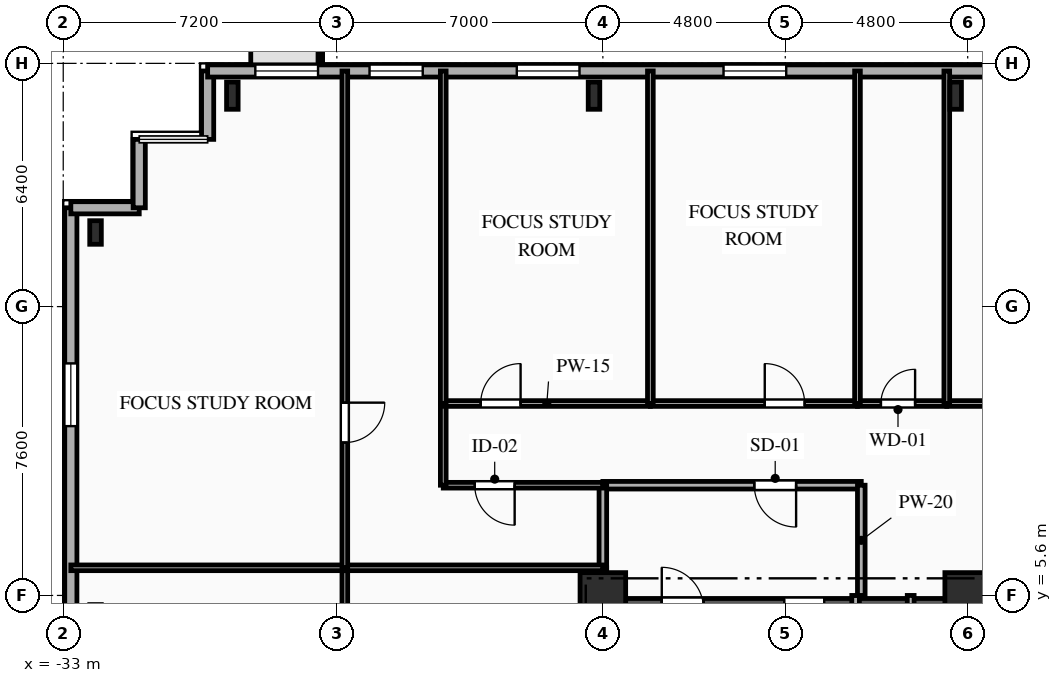
"""IFC4 building model, lengths in metres.
Left out: names, types, materials, properties, quantities, classifications, styles, units other than length and angle.
Written with IfcOpenShell. Run it as: python <this file> out.ifc"""

import sys

from ifc_helpers import new_model, si_unit, direction, frame, frame_2d, origin, origin_2d, place, context, subcontext, project, spatial, rectangle, i_section, extrude, element, fill, save


model = new_model("IFC4")
c1 = context("Model", 3, precision=1e-05, world=origin(), true_north=direction((0.0, 1.0)))
c2 = subcontext(c1, "Body", "Model", "MODEL_VIEW")
j1 = project(units=[si_unit("LENGTHUNIT", "METRE"), si_unit("PLANEANGLEUNIT", "RADIAN")], contexts=[c1])
p1 = place(None, origin())
s1 = spatial("IfcSite", under=j1, at=p1, CompositionType="ELEMENT")
p2 = place(p1, origin())
s2 = spatial("IfcBuilding", under=s1, at=p2, CompositionType="ELEMENT")
p3 = place(p2, frame((0.0, 0.0, 67.2)))
s3 = spatial("IfcBuildingStorey", under=s2, at=p3, CompositionType="ELEMENT", Elevation=67.2)
for number, where, z_axis, x_axis in (
    (1, (-18.8, 5.6, 0.0), (0.0, 0.0, 1.0), (1.0, 0.0, 0.0)),
    (2, (-9.2, 5.6, 0.0), (0.0, 0.0, 1.0), (1.0, 0.0, 0.0)),
):
    element("IfcColumn", number, at=place(p3, frame(where, z_axis=z_axis, x_axis=x_axis)), inside=s3, PredefinedType="COLUMN", context=c2, shape_type="SweptSolid", body=[
        extrude(rectangle(XDim=1.2, YDim=1.2, at=origin_2d()), origin(), (0.0, 0.0, 1.0), 3.35),
    ])
for number, where, z_axis, x_axis in (
    (3, (-9.517, 18.75, 0.0), (0.0, 0.0, 1.0), (1.0, 0.0, 0.0)),
    (4, (-19.033, 18.75, 0.0), (0.0, 0.0, 1.0), (1.0, 0.0, 0.0)),
    (5, (-28.55, 18.75, 0.0), (0.0, 0.0, 1.0), (1.0, 0.0, 0.0)),
):
    element("IfcColumn", number, at=place(p3, frame(where, z_axis=z_axis, x_axis=x_axis)), inside=s3, PredefinedType="COLUMN", context=c2, shape_type="SweptSolid", body=[
        extrude(i_section(OverallWidth=0.304, OverallDepth=0.716, WebThickness=0.021, FlangeThickness=0.04, FilletRadius=0.027, at=origin_2d()), origin(), (0.0, 0.0, 1.0), 3.35),
    ])
p4 = place(p3, frame((-32.15, 15.15, 0.0), z_axis=(0.0, 0.0, 1.0), x_axis=(1.0, 0.0, 0.0)))
e6 = element("IfcColumn", 6, at=p4, inside=s3, PredefinedType="COLUMN", context=c2, shape_type="SweptSolid", body=[
    extrude(i_section(OverallWidth=0.305, OverallDepth=0.62, WebThickness=0.021, FlangeThickness=0.04, FilletRadius=0.027, at=origin_2d()), origin(), (0.0, 0.0, 1.0), 3.35),
])
p5 = place(p3, frame((-32.8, -15.8, 0.0), z_axis=(0.0, 0.0, 1.0), x_axis=(0.0, 1.0, 0.0)))
e7 = element("IfcWall", 7, at=p5, inside=s3, PredefinedType="SOLIDWALL", context=c2, shape_type="SweptSolid", body=[
    extrude(rectangle(XDim=31.6, YDim=0.32, at=frame_2d((15.8, 0.0))), origin(), (0.0, 0.0, 1.0), 3.035),
])
p6 = place(p5, frame((4.175, 0.0, 0.85)))
e8 = element("IfcOpeningElement", 8, at=p6, cuts=e7, PredefinedType="OPENING", context=c2, shape_type="SweptSolid", body=[
    extrude(rectangle(XDim=1.65, YDim=1.85, at=frame_2d((0.825, 0.925))), frame((0.0, 0.17, 0.0), z_axis=(0.0, -1.0, 0.0), x_axis=(1.0, 0.0, 0.0)), (0.0, 0.0, 1.0), 0.34),
])
p7 = place(p5, frame((15.015, 0.0, 0.85)))
e9 = element("IfcOpeningElement", 9, at=p7, cuts=e7, PredefinedType="OPENING", context=c2, shape_type="SweptSolid", body=[
    extrude(rectangle(XDim=1.65, YDim=1.85, at=frame_2d((0.825, 0.925))), frame((0.0, 0.17, 0.0), z_axis=(0.0, -1.0, 0.0), x_axis=(1.0, 0.0, 0.0)), (0.0, 0.0, 1.0), 0.34),
])
p8 = place(p5, frame((25.855, 0.0, 0.85)))
e10 = element("IfcOpeningElement", 10, at=p8, cuts=e7, PredefinedType="OPENING", context=c2, shape_type="SweptSolid", body=[
    extrude(rectangle(XDim=1.65, YDim=1.85, at=frame_2d((0.825, 0.925))), frame((0.0, 0.17, 0.0), z_axis=(0.0, -1.0, 0.0), x_axis=(1.0, 0.0, 0.0)), (0.0, 0.0, 1.0), 0.34),
])
for number, where, z_axis, x_axis in (
    (11, (-32.8, 15.8, 0.0), (0.0, 0.0, 1.0), (1.0, 0.0, 0.0)),
    (12, (-31.0, 15.8, 0.0), (0.0, 0.0, 1.0), (0.0, 1.0, 0.0)),
):
    element("IfcWall", number, at=place(p3, frame(where, z_axis=z_axis, x_axis=x_axis)), inside=s3, PredefinedType="SOLIDWALL", context=c2, shape_type="SweptSolid", body=[
        extrude(rectangle(XDim=1.8, YDim=0.32, at=frame_2d((0.9, 0.0))), origin(), (0.0, 0.0, 1.0), 3.035),
    ])
p9 = place(p3, frame((-29.2, 17.6, 0.0), z_axis=(0.0, 0.0, 1.0), x_axis=(0.0, 1.0, 0.0)))
e13 = element("IfcWall", 13, at=p9, inside=s3, PredefinedType="SOLIDWALL", context=c2, shape_type="SweptSolid", body=[
    extrude(rectangle(XDim=1.8, YDim=0.32, at=frame_2d((0.9, 0.0))), origin(), (0.0, 0.0, 1.0), 3.035),
])
p10 = place(p3, frame((-29.2, 19.4, 0.0), z_axis=(0.0, 0.0, 1.0), x_axis=(1.0, 0.0, 0.0)))
e14 = element("IfcWall", 14, at=p10, inside=s3, PredefinedType="SOLIDWALL", context=c2, shape_type="SweptSolid", body=[
    extrude(rectangle(XDim=58.4, YDim=0.32, at=frame_2d((29.2, 0.0))), origin(), (0.0, 0.0, 1.0), 3.035),
])
p11 = place(p10, frame((1.255, 0.0, 0.85)))
e15 = element("IfcOpeningElement", 15, at=p11, cuts=e14, PredefinedType="OPENING", context=c2, shape_type="SweptSolid", body=[
    extrude(rectangle(XDim=1.65, YDim=1.85, at=frame_2d((0.825, 0.925))), frame((0.0, 0.17, 0.0), z_axis=(0.0, -1.0, 0.0), x_axis=(1.0, 0.0, 0.0)), (0.0, 0.0, 1.0), 0.34),
])
p12 = place(p10, frame((4.26, 0.0, 0.85)))
e16 = element("IfcOpeningElement", 16, at=p12, cuts=e14, PredefinedType="OPENING", context=c2, shape_type="SweptSolid", body=[
    extrude(rectangle(XDim=1.4, YDim=1.85, at=frame_2d((0.7, 0.925))), frame((0.0, 0.17, 0.0), z_axis=(0.0, -1.0, 0.0), x_axis=(1.0, 0.0, 0.0)), (0.0, 0.0, 1.0), 0.34),
])
p13 = place(p10, frame((8.135, 0.0, 0.85)))
e17 = element("IfcOpeningElement", 17, at=p13, cuts=e14, PredefinedType="OPENING", context=c2, shape_type="SweptSolid", body=[
    extrude(rectangle(XDim=1.65, YDim=1.85, at=frame_2d((0.825, 0.925))), frame((0.0, 0.17, 0.0), z_axis=(0.0, -1.0, 0.0), x_axis=(1.0, 0.0, 0.0)), (0.0, 0.0, 1.0), 0.34),
])
p14 = place(p10, frame((13.575, 0.0, 0.85)))
e18 = element("IfcOpeningElement", 18, at=p14, cuts=e14, PredefinedType="OPENING", context=c2, shape_type="SweptSolid", body=[
    extrude(rectangle(XDim=1.65, YDim=1.85, at=frame_2d((0.825, 0.925))), frame((0.0, 0.17, 0.0), z_axis=(0.0, -1.0, 0.0), x_axis=(1.0, 0.0, 0.0)), (0.0, 0.0, 1.0), 0.34),
])
p15 = place(p10, frame((23.33, 0.0, 0.85)))
e19 = element("IfcOpeningElement", 19, at=p15, cuts=e14, PredefinedType="OPENING", context=c2, shape_type="SweptSolid", body=[
    extrude(rectangle(XDim=1.5, YDim=1.85, at=frame_2d((0.75, 0.925))), frame((0.0, 0.17, 0.0), z_axis=(0.0, -1.0, 0.0), x_axis=(1.0, 0.0, 0.0)), (0.0, 0.0, 1.0), 0.34),
])
p16 = place(p10, frame((33.3, 0.0, 0.85)))
e20 = element("IfcOpeningElement", 20, at=p16, cuts=e14, PredefinedType="OPENING", context=c2, shape_type="SweptSolid", body=[
    extrude(rectangle(XDim=2.2, YDim=1.85, at=frame_2d((1.1, 0.925))), frame((0.0, 0.17, 0.0), z_axis=(0.0, -1.0, 0.0), x_axis=(1.0, 0.0, 0.0)), (0.0, 0.0, 1.0), 0.34),
])
p17 = place(p10, frame((42.335, 0.0, 0.85)))
e21 = element("IfcOpeningElement", 21, at=p17, cuts=e14, PredefinedType="OPENING", context=c2, shape_type="SweptSolid", body=[
    extrude(rectangle(XDim=1.65, YDim=1.85, at=frame_2d((0.825, 0.925))), frame((0.0, 0.17, 0.0), z_axis=(0.0, -1.0, 0.0), x_axis=(1.0, 0.0, 0.0)), (0.0, 0.0, 1.0), 0.34),
])
p18 = place(p10, frame((48.905, 0.0, 0.85)))
e22 = element("IfcOpeningElement", 22, at=p18, cuts=e14, PredefinedType="OPENING", context=c2, shape_type="SweptSolid", body=[
    extrude(rectangle(XDim=1.65, YDim=1.85, at=frame_2d((0.825, 0.925))), frame((0.0, 0.17, 0.0), z_axis=(0.0, -1.0, 0.0), x_axis=(1.0, 0.0, 0.0)), (0.0, 0.0, 1.0), 0.34),
])
p19 = place(p10, frame((54.37, 0.0, 0.85)))
e23 = element("IfcOpeningElement", 23, at=p19, cuts=e14, PredefinedType="OPENING", context=c2, shape_type="SweptSolid", body=[
    extrude(rectangle(XDim=1.5, YDim=1.85, at=frame_2d((0.75, 0.925))), frame((0.0, 0.17, 0.0), z_axis=(0.0, -1.0, 0.0), x_axis=(1.0, 0.0, 0.0)), (0.0, 0.0, 1.0), 0.34),
])
p20 = place(p3, frame((-18.8, 5.24, 0.0), z_axis=(0.0, 0.0, 1.0), x_axis=(1.0, 0.0, 0.0)))
e24 = element("IfcWall", 24, at=p20, inside=s3, PredefinedType="SHEAR", context=c2, shape_type="SweptSolid", body=[
    extrude(rectangle(XDim=9.6, YDim=0.56, at=frame_2d((4.8, 0.0))), origin(), (0.0, 0.0, 1.0), 3.035),
])
p21 = place(p20, frame((1.55, 0.0, 0.0)))
e25 = element("IfcOpeningElement", 25, at=p21, cuts=e24, PredefinedType="OPENING", context=c2, shape_type="SweptSolid", body=[
    extrude(rectangle(XDim=1.1, YDim=2.15, at=frame_2d((0.55, 1.075))), frame((0.0, 0.29, 0.0), z_axis=(0.0, -1.0, 0.0), x_axis=(1.0, 0.0, 0.0)), (0.0, 0.0, 1.0), 0.58),
])
p22 = place(p20, frame((4.775, 0.0, 0.0)))
e26 = element("IfcOpeningElement", 26, at=p22, cuts=e24, PredefinedType="OPENING", context=c2, shape_type="SweptSolid", body=[
    extrude(rectangle(XDim=1.05, YDim=2.1, at=frame_2d((0.525, 1.05))), frame((0.0, 0.29, 0.0), z_axis=(0.0, -1.0, 0.0), x_axis=(1.0, 0.0, 0.0)), (0.0, 0.0, 1.0), 0.58),
])
p23 = place(p3, frame((-12.15, 1.55, 0.0), z_axis=(0.0, 0.0, 1.0), x_axis=(0.0, 1.0, 0.0)))
e27 = element("IfcWall", 27, at=p23, inside=s3, PredefinedType="PARTITIONING", context=c2, shape_type="SweptSolid", body=[
    extrude(rectangle(XDim=4.05, YDim=0.2, at=frame_2d((2.025, 0.0))), origin(), (0.0, 0.0, 1.0), 3.035),
])
p24 = place(p3, frame((-12.0, 8.5, 0.0), z_axis=(0.0, 0.0, 1.0), x_axis=(-1.0, 0.0, 0.0)))
e28 = element("IfcWall", 28, at=p24, inside=s3, PredefinedType="PARTITIONING", context=c2, shape_type="SweptSolid", body=[
    extrude(rectangle(XDim=6.8, YDim=0.2, at=frame_2d((3.4, 0.0))), origin(), (0.0, 0.0, 1.0), 3.035),
])
p25 = place(p24, frame((1.715, 0.0, 0.0)))
e29 = element("IfcOpeningElement", 29, at=p25, cuts=e28, PredefinedType="OPENING", context=c2, shape_type="SweptSolid", body=[
    extrude(rectangle(XDim=1.1, YDim=2.15, at=frame_2d((0.55, 1.075))), frame((0.0, 0.11, 0.0), z_axis=(0.0, -1.0, 0.0), x_axis=(1.0, 0.0, 0.0)), (0.0, 0.0, 1.0), 0.22),
])
p26 = place(p3, frame((-12.0, 5.6, 0.0), z_axis=(0.0, 0.0, 1.0), x_axis=(0.0, 1.0, 0.0)))
e30 = element("IfcWall", 30, at=p26, inside=s3, PredefinedType="PARTITIONING", context=c2, shape_type="SweptSolid", body=[
    extrude(rectangle(XDim=2.9, YDim=0.2, at=frame_2d((1.45, 0.0))), origin(), (0.0, 0.0, 1.0), 3.035),
])
p27 = place(p3, frame((-18.8, 6.327, 0.0), z_axis=(0.0, 0.0, 1.0), x_axis=(0.0, -1.0, 0.0)))
e31 = element("IfcWall", 31, at=p27, inside=s3, PredefinedType="PARTITIONING", context=c2, shape_type="SweptSolid", body=[
    extrude(rectangle(XDim=0.727, YDim=0.2, at=frame_2d((0.363, 0.0))), origin(), (0.0, 0.0, 1.0), 2.52),
])
p28 = place(p3, frame((-18.8, 8.5, 0.0), z_axis=(0.0, 0.0, 1.0), x_axis=(0.0, -1.0, 0.0)))
e32 = element("IfcWall", 32, at=p28, inside=s3, PredefinedType="PARTITIONING", context=c2, shape_type="SweptSolid", body=[
    extrude(rectangle(XDim=2.173, YDim=0.2, at=frame_2d((1.086, 0.0))), origin(), (0.0, 0.0, 1.0), 2.52),
])
p29 = place(p3, frame((-10.7, 5.6, 0.0), z_axis=(0.0, 0.0, 1.0), x_axis=(0.0, -1.0, 0.0)))
e33 = element("IfcWall", 33, at=p29, inside=s3, PredefinedType="PARTITIONING", context=c2, shape_type="SweptSolid", body=[
    extrude(rectangle(XDim=4.05, YDim=0.18, at=frame_2d((2.025, 0.0))), origin(), (0.0, 0.0, 1.0), 3.035),
])
p30 = place(p29, frame((1.325, 0.0, 0.0)))
e34 = element("IfcOpeningElement", 34, at=p30, cuts=e33, PredefinedType="OPENING", context=c2, shape_type="SweptSolid", body=[
    extrude(rectangle(XDim=1.25, YDim=2.2, at=frame_2d((0.625, 1.1))), frame((0.0, 0.1, 0.0), z_axis=(0.0, -1.0, 0.0), x_axis=(1.0, 0.0, 0.0)), (0.0, 0.0, 1.0), 0.2),
])
p31 = place(p3, frame((-18.8, 8.5, 0.0), z_axis=(0.0, 0.0, 1.0), x_axis=(-1.0, 0.0, 0.0)))
e35 = element("IfcWall", 35, at=p31, inside=s3, PredefinedType="PARTITIONING", context=c2, shape_type="SweptSolid", body=[
    extrude(rectangle(XDim=4.2, YDim=0.15, at=frame_2d((2.1, 0.0))), origin(), (0.0, 0.0, 1.0), 3.035),
])
p32 = place(p31, frame((2.321, 0.0, 0.0)))
e36 = element("IfcOpeningElement", 36, at=p32, cuts=e35, PredefinedType="OPENING", context=c2, shape_type="SweptSolid", body=[
    extrude(rectangle(XDim=1.05, YDim=2.15, at=frame_2d((0.525, 1.075))), frame((0.0, 0.085, 0.0), z_axis=(0.0, -1.0, 0.0), x_axis=(1.0, 0.0, 0.0)), (0.0, 0.0, 1.0), 0.17),
])
p33 = place(p3, frame((-23.0, 8.5, 0.0), z_axis=(0.0, 0.0, 1.0), x_axis=(0.0, 1.0, 0.0)))
e37 = element("IfcWall", 37, at=p33, inside=s3, PredefinedType="PARTITIONING", context=c2, shape_type="SweptSolid", body=[
    extrude(rectangle(XDim=2.15, YDim=0.15, at=frame_2d((1.075, 0.0))), origin(), (0.0, 0.0, 1.0), 3.035),
])
p34 = place(p3, frame((-23.0, 10.65, 0.0), z_axis=(0.0, 0.0, 1.0), x_axis=(1.0, 0.0, 0.0)))
e38 = element("IfcWall", 38, at=p34, inside=s3, PredefinedType="PARTITIONING", context=c2, shape_type="SweptSolid", body=[
    extrude(rectangle(XDim=5.45, YDim=0.15, at=frame_2d((2.725, 0.0))), origin(), (0.0, 0.0, 1.0), 3.035),
])
p35 = place(p34, frame((0.985, 0.0, 0.0)))
e39 = element("IfcOpeningElement", 39, at=p35, cuts=e38, PredefinedType="OPENING", context=c2, shape_type="SweptSolid", body=[
    extrude(rectangle(XDim=1.05, YDim=2.15, at=frame_2d((0.525, 1.075))), frame((0.0, 0.085, 0.0), z_axis=(0.0, -1.0, 0.0), x_axis=(1.0, 0.0, 0.0)), (0.0, 0.0, 1.0), 0.17),
])
p36 = place(p3, frame((-17.55, 10.65, 0.0), z_axis=(0.0, 0.0, 1.0), x_axis=(1.0, 0.0, 0.0)))
e40 = element("IfcWall", 40, at=p36, inside=s3, PredefinedType="PARTITIONING", context=c2, shape_type="SweptSolid", body=[
    extrude(rectangle(XDim=5.45, YDim=0.15, at=frame_2d((2.725, 0.0))), origin(), (0.0, 0.0, 1.0), 3.035),
])
p37 = place(p36, frame((3.01, 0.0, 0.0)))
e41 = element("IfcOpeningElement", 41, at=p37, cuts=e40, PredefinedType="OPENING", context=c2, shape_type="SweptSolid", body=[
    extrude(rectangle(XDim=1.05, YDim=2.15, at=frame_2d((0.525, 1.075))), frame((0.0, 0.085, 0.0), z_axis=(0.0, -1.0, 0.0), x_axis=(1.0, 0.0, 0.0)), (0.0, 0.0, 1.0), 0.17),
])
p38 = place(p3, frame((-12.1, 10.65, 0.0), z_axis=(0.0, 0.0, 1.0), x_axis=(1.0, 0.0, 0.0)))
e42 = element("IfcWall", 42, at=p38, inside=s3, PredefinedType="PLUMBINGWALL", context=c2, shape_type="SweptSolid", body=[
    extrude(rectangle(XDim=2.35, YDim=0.15, at=frame_2d((1.175, 0.0))), origin(), (0.0, 0.0, 1.0), 3.035),
])
p39 = place(p38, frame((0.616, 0.0, 0.0)))
e43 = element("IfcOpeningElement", 43, at=p39, cuts=e42, PredefinedType="OPENING", context=c2, shape_type="SweptSolid", body=[
    extrude(rectangle(XDim=0.9, YDim=2.1, at=frame_2d((0.45, 1.05))), frame((0.0, 0.085, 0.0), z_axis=(0.0, -1.0, 0.0), x_axis=(1.0, 0.0, 0.0)), (0.0, 0.0, 1.0), 0.17),
])
p40 = place(p3, frame((-9.75, 10.65, 0.0), z_axis=(0.0, 0.0, 1.0), x_axis=(1.0, 0.0, 0.0)))
e44 = element("IfcWall", 44, at=p40, inside=s3, PredefinedType="PARTITIONING", context=c2, shape_type="SweptSolid", body=[
    extrude(rectangle(XDim=9.15, YDim=0.15, at=frame_2d((4.575, 0.0))), origin(), (0.0, 0.0, 1.0), 3.035),
])
p41 = place(p40, frame((6.74, 0.0, 0.0)))
e45 = element("IfcOpeningElement", 45, at=p41, cuts=e44, PredefinedType="OPENING", context=c2, shape_type="SweptSolid", body=[
    extrude(rectangle(XDim=0.95, YDim=2.1, at=frame_2d((0.475, 1.05))), frame((0.0, 0.085, 0.0), z_axis=(0.0, -1.0, 0.0), x_axis=(1.0, 0.0, 0.0)), (0.0, 0.0, 1.0), 0.17),
])
p42 = place(p3, frame((-25.59, 6.327, 0.0), z_axis=(0.0, 0.0, 1.0), x_axis=(0.0, -1.0, 0.0)))
e46 = element("IfcWall", 46, at=p42, inside=s3, PredefinedType="PARTITIONING", context=c2, shape_type="SweptSolid", body=[
    extrude(rectangle(XDim=12.654, YDim=0.15, at=frame_2d((6.327, 0.0))), origin(), (0.0, 0.0, 1.0), 2.69),
])
p43 = place(p42, frame((5.802, 0.0, 0.0)))
e47 = element("IfcOpeningElement", 47, at=p43, cuts=e46, PredefinedType="OPENING", context=c2, shape_type="SweptSolid", body=[
    extrude(rectangle(XDim=1.05, YDim=2.15, at=frame_2d((0.525, 1.075))), frame((0.0, 0.085, 0.0), z_axis=(0.0, -1.0, 0.0), x_axis=(1.0, 0.0, 0.0)), (0.0, 0.0, 1.0), 0.17),
])
p44 = place(p3, frame((-32.8, 6.327, 0.0), z_axis=(0.0, 0.0, 1.0), x_axis=(1.0, 0.0, 0.0)))
e48 = element("IfcWall", 48, at=p44, inside=s3, PredefinedType="PARTITIONING", context=c2, shape_type="SweptSolid", body=[
    extrude(rectangle(XDim=7.21, YDim=0.15, at=frame_2d((3.605, 0.0))), origin(), (0.0, 0.0, 1.0), 3.035),
])
p45 = place(p3, frame((-25.59, 6.327, 0.0), z_axis=(0.0, 0.0, 1.0), x_axis=(1.0, 0.0, 0.0)))
e49 = element("IfcWall", 49, at=p45, inside=s3, PredefinedType="PARTITIONING", context=c2, shape_type="SweptSolid", body=[
    extrude(rectangle(XDim=6.79, YDim=0.15, at=frame_2d((3.395, 0.0))), origin(), (0.0, 0.0, 1.0), 3.035),
])
p46 = place(p3, frame((-25.59, 19.4, 0.0), z_axis=(0.0, 0.0, 1.0), x_axis=(0.0, -1.0, 0.0)))
e50 = element("IfcWall", 50, at=p46, inside=s3, PredefinedType="PARTITIONING", context=c2, shape_type="SweptSolid", body=[
    extrude(rectangle(XDim=13.073, YDim=0.15, at=frame_2d((6.537, 0.0))), origin(), (0.0, 0.0, 1.0), 2.69),
])
p47 = place(p46, frame((8.727, 0.0, 0.0)))
e51 = element("IfcOpeningElement", 51, at=p47, cuts=e50, PredefinedType="OPENING", context=c2, shape_type="SweptSolid", body=[
    extrude(rectangle(XDim=1.05, YDim=2.15, at=frame_2d((0.525, 1.075))), frame((0.0, 0.085, 0.0), z_axis=(0.0, -1.0, 0.0), x_axis=(1.0, 0.0, 0.0)), (0.0, 0.0, 1.0), 0.17),
])
for number, where, z_axis, x_axis in (
    (52, (-23.0, 19.4, 0.0), (0.0, 0.0, 1.0), (0.0, -1.0, 0.0)),
    (53, (-17.55, 19.4, 0.0), (0.0, 0.0, 1.0), (0.0, -1.0, 0.0)),
):
    element("IfcWall", number, at=place(p3, frame(where, z_axis=z_axis, x_axis=x_axis)), inside=s3, PredefinedType="PARTITIONING", context=c2, shape_type="SweptSolid", body=[
        extrude(rectangle(XDim=8.75, YDim=0.15, at=frame_2d((4.375, 0.0))), origin(), (0.0, 0.0, 1.0), 3.035),
    ])
for number, where, z_axis, x_axis in (
    (54, (-12.1, 19.4, 0.0), (0.0, 0.0, 1.0), (0.0, -1.0, 0.0)),
    (55, (-9.75, 19.4, 0.0), (0.0, 0.0, 1.0), (0.0, -1.0, 0.0)),
):
    element("IfcWall", number, at=place(p3, frame(where, z_axis=z_axis, x_axis=x_axis)), inside=s3, PredefinedType="PLUMBINGWALL", context=c2, shape_type="SweptSolid", body=[
        extrude(rectangle(XDim=8.75, YDim=0.15, at=frame_2d((4.375, 0.0))), origin(), (0.0, 0.0, 1.0), 3.035),
    ])
p48 = place(p8, origin())
e56 = element("IfcWindow", 56, at=p48, inside=s3, PartitioningType="SINGLE_PANEL", PredefinedType="WINDOW", context=c2, shape_type="SweptSolid", body=[
    extrude(rectangle(XDim=1.65, YDim=1.85, at=frame_2d((0.825, 0.925))), frame((0.0, 0.03, 0.0), z_axis=(0.0, -1.0, 0.0), x_axis=(1.0, 0.0, 0.0)), (0.0, 0.0, 1.0), 0.06),
])
fill(e10, e56)
p49 = place(p11, origin())
e57 = element("IfcWindow", 57, at=p49, inside=s3, PartitioningType="SINGLE_PANEL", PredefinedType="WINDOW", context=c2, shape_type="SweptSolid", body=[
    extrude(rectangle(XDim=1.65, YDim=1.85, at=frame_2d((0.825, 0.925))), frame((0.0, 0.03, 0.0), z_axis=(0.0, -1.0, 0.0), x_axis=(1.0, 0.0, 0.0)), (0.0, 0.0, 1.0), 0.06),
])
fill(e15, e57)
p50 = place(p12, origin())
e58 = element("IfcWindow", 58, at=p50, inside=s3, PartitioningType="SINGLE_PANEL", PredefinedType="WINDOW", context=c2, shape_type="SweptSolid", body=[
    extrude(rectangle(XDim=1.4, YDim=1.85, at=frame_2d((0.7, 0.925))), frame((0.0, 0.03, 0.0), z_axis=(0.0, -1.0, 0.0), x_axis=(1.0, 0.0, 0.0)), (0.0, 0.0, 1.0), 0.06),
])
fill(e16, e58)
p51 = place(p13, origin())
e59 = element("IfcWindow", 59, at=p51, inside=s3, PartitioningType="SINGLE_PANEL", PredefinedType="WINDOW", context=c2, shape_type="SweptSolid", body=[
    extrude(rectangle(XDim=1.65, YDim=1.85, at=frame_2d((0.825, 0.925))), frame((0.0, 0.03, 0.0), z_axis=(0.0, -1.0, 0.0), x_axis=(1.0, 0.0, 0.0)), (0.0, 0.0, 1.0), 0.06),
])
fill(e17, e59)
p52 = place(p14, origin())
e60 = element("IfcWindow", 60, at=p52, inside=s3, PartitioningType="SINGLE_PANEL", PredefinedType="WINDOW", context=c2, shape_type="SweptSolid", body=[
    extrude(rectangle(XDim=1.65, YDim=1.85, at=frame_2d((0.825, 0.925))), frame((0.0, 0.03, 0.0), z_axis=(0.0, -1.0, 0.0), x_axis=(1.0, 0.0, 0.0)), (0.0, 0.0, 1.0), 0.06),
])
fill(e18, e60)
p53 = place(p25, origin())
e61 = element("IfcDoor", 61, at=p53, inside=s3, OperationType="SINGLE_SWING_LEFT", PredefinedType="DOOR", context=c2, shape_type="SweptSolid", body=[
    extrude(rectangle(XDim=1.1, YDim=2.15, at=frame_2d((0.55, 1.075))), frame((0.0, 0.025, 0.0), z_axis=(0.0, -1.0, 0.0), x_axis=(1.0, 0.0, 0.0)), (0.0, 0.0, 1.0), 0.05),
])
fill(e29, e61)
p54 = place(p32, origin())
e62 = element("IfcDoor", 62, at=p54, inside=s3, OperationType="SINGLE_SWING_LEFT", PredefinedType="DOOR", context=c2, shape_type="SweptSolid", body=[
    extrude(rectangle(XDim=1.05, YDim=2.15, at=frame_2d((0.525, 1.075))), frame((0.0, 0.025, 0.0), z_axis=(0.0, -1.0, 0.0), x_axis=(1.0, 0.0, 0.0)), (0.0, 0.0, 1.0), 0.05),
])
fill(e36, e62)
p55 = place(p35, origin())
e63 = element("IfcDoor", 63, at=p55, inside=s3, OperationType="SINGLE_SWING_RIGHT", PredefinedType="DOOR", context=c2, shape_type="SweptSolid", body=[
    extrude(rectangle(XDim=1.05, YDim=2.15, at=frame_2d((0.525, 1.075))), frame((0.0, 0.025, 0.0), z_axis=(0.0, -1.0, 0.0), x_axis=(1.0, 0.0, 0.0)), (0.0, 0.0, 1.0), 0.05),
])
fill(e39, e63)
p56 = place(p37, origin())
e64 = element("IfcDoor", 64, at=p56, inside=s3, OperationType="SINGLE_SWING_LEFT", PredefinedType="DOOR", context=c2, shape_type="SweptSolid", body=[
    extrude(rectangle(XDim=1.05, YDim=2.15, at=frame_2d((0.525, 1.075))), frame((0.0, 0.025, 0.0), z_axis=(0.0, -1.0, 0.0), x_axis=(1.0, 0.0, 0.0)), (0.0, 0.0, 1.0), 0.05),
])
fill(e41, e64)
p57 = place(p39, origin())
e65 = element("IfcDoor", 65, at=p57, inside=s3, OperationType="SINGLE_SWING_RIGHT", PredefinedType="DOOR", context=c2, shape_type="SweptSolid", body=[
    extrude(rectangle(XDim=0.9, YDim=2.1, at=frame_2d((0.45, 1.05))), frame((0.0, 0.025, 0.0), z_axis=(0.0, -1.0, 0.0), x_axis=(1.0, 0.0, 0.0)), (0.0, 0.0, 1.0), 0.05),
])
fill(e43, e65)
p58 = place(p47, origin())
e66 = element("IfcDoor", 66, at=p58, inside=s3, OperationType="SINGLE_SWING_LEFT", PredefinedType="DOOR", context=c2, shape_type="SweptSolid", body=[
    extrude(rectangle(XDim=1.05, YDim=2.15, at=frame_2d((0.525, 1.075))), frame((0.0, 0.025, 0.0), z_axis=(0.0, -1.0, 0.0), x_axis=(1.0, 0.0, 0.0)), (0.0, 0.0, 1.0), 0.05),
])
fill(e51, e66)
save(model, sys.argv[1])
